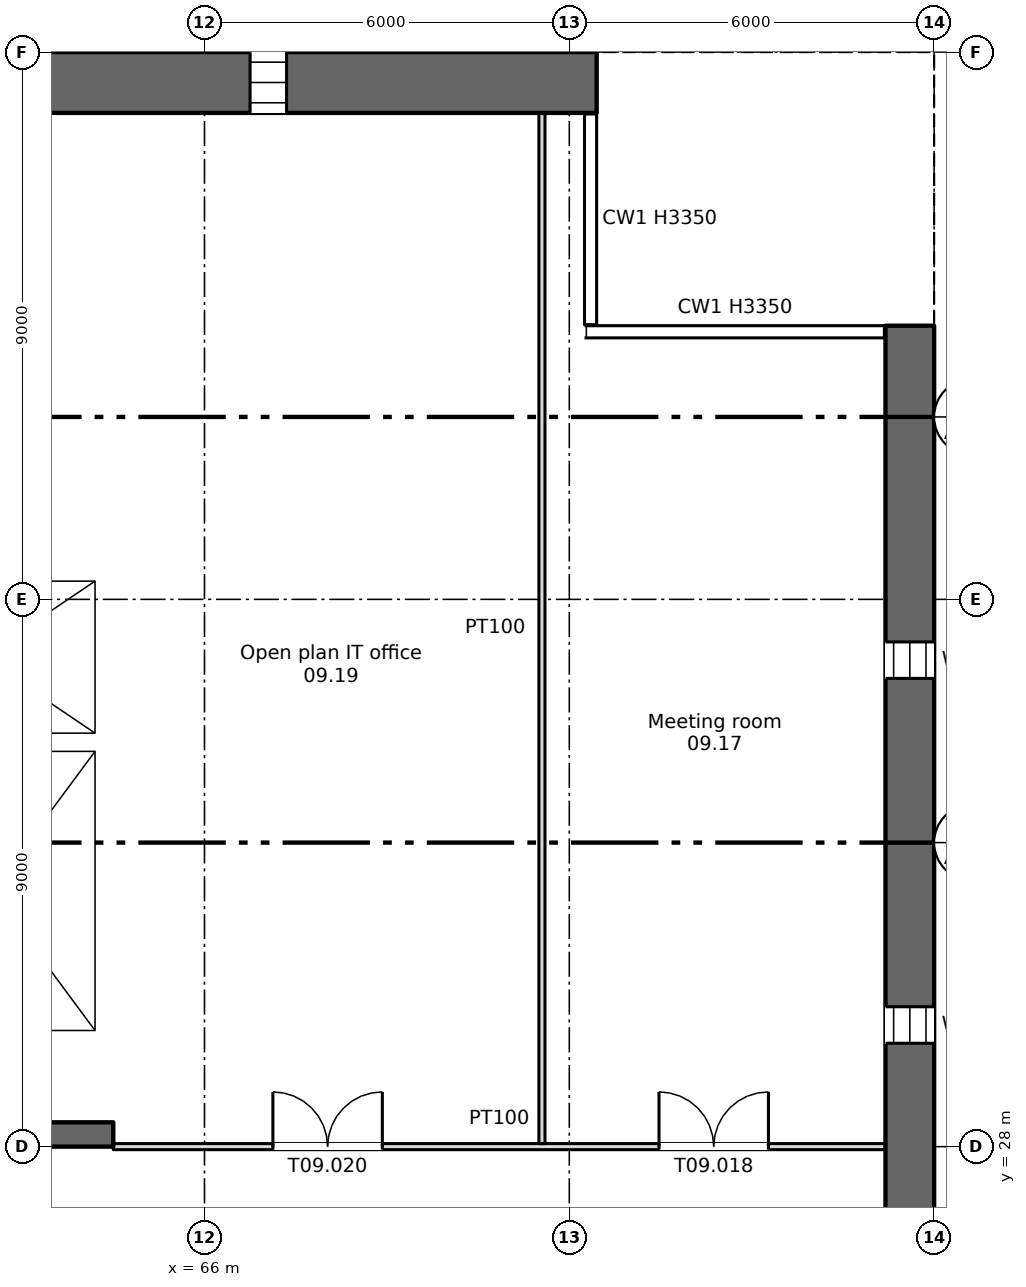
"""IFC4 building model, lengths in metres.
Left out: names, types, materials, properties, quantities, classifications, styles, units other than length and angle.
Written with IfcOpenShell. Run it as: python <this file> out.ifc"""

import sys

from ifc_helpers import new_model, si_unit, direction, frame, frame_2d, origin, place, context, subcontext, project, spatial, rectangle, extrude, element, fill, save


model = new_model("IFC4")
c1 = context("Model", 3, precision=1e-05, world=origin(), true_north=direction((0.0, 1.0)))
c2 = subcontext(c1, "Body", "Model", "MODEL_VIEW")
j1 = project(units=[si_unit("LENGTHUNIT", "METRE"), si_unit("PLANEANGLEUNIT", "RADIAN")], contexts=[c1])
p1 = place(None, origin())
s1 = spatial("IfcSite", under=j1, at=p1, CompositionType="ELEMENT")
p2 = place(p1, origin())
s2 = spatial("IfcBuilding", under=s1, at=p2, CompositionType="ELEMENT")
p3 = place(p2, frame((0.0, 0.0, 41.25)))
s3 = spatial("IfcBuildingStorey", under=s2, at=p3, CompositionType="ELEMENT", Elevation=41.25)
p4 = place(p3, frame((77.6, 4.5, 0.0), z_axis=(0.0, 0.0, 1.0), x_axis=(0.0, 1.0, 0.0)))
e1 = element("IfcWall", 1, at=p4, inside=s3, PredefinedType="SHEAR", context=c2, shape_type="SweptSolid", body=[
    extrude(rectangle(XDim=37.0, YDim=0.8, at=frame_2d((18.5, 0.0))), origin(), (0.0, 0.0, 1.0), 3.35),
])
p5 = place(p4, frame((1.2, 0.0, 0.6)))
e2 = element("IfcOpeningElement", 2, at=p5, cuts=e1, PredefinedType="OPENING", context=c2, shape_type="SweptSolid", body=[
    extrude(rectangle(XDim=0.6, YDim=2.4, at=frame_2d((0.3, 1.2))), frame((0.0, 0.41, 0.0), z_axis=(0.0, -1.0, 0.0), x_axis=(1.0, 0.0, 0.0)), (0.0, 0.0, 1.0), 0.82),
])
p6 = place(p4, frame((7.2, 0.0, 0.6)))
e3 = element("IfcOpeningElement", 3, at=p6, cuts=e1, PredefinedType="OPENING", context=c2, shape_type="SweptSolid", body=[
    extrude(rectangle(XDim=0.6, YDim=2.4, at=frame_2d((0.3, 1.2))), frame((0.0, 0.41, 0.0), z_axis=(0.0, -1.0, 0.0), x_axis=(1.0, 0.0, 0.0)), (0.0, 0.0, 1.0), 0.82),
])
p7 = place(p4, frame((13.2, 0.0, 0.6)))
e4 = element("IfcOpeningElement", 4, at=p7, cuts=e1, PredefinedType="OPENING", context=c2, shape_type="SweptSolid", body=[
    extrude(rectangle(XDim=0.6, YDim=2.4, at=frame_2d((0.3, 1.2))), frame((0.0, 0.41, 0.0), z_axis=(0.0, -1.0, 0.0), x_axis=(1.0, 0.0, 0.0)), (0.0, 0.0, 1.0), 0.82),
])
p8 = place(p4, frame((19.2, 0.0, 0.6)))
e5 = element("IfcOpeningElement", 5, at=p8, cuts=e1, PredefinedType="OPENING", context=c2, shape_type="SweptSolid", body=[
    extrude(rectangle(XDim=0.6, YDim=2.4, at=frame_2d((0.3, 1.2))), frame((0.0, 0.41, 0.0), z_axis=(0.0, -1.0, 0.0), x_axis=(1.0, 0.0, 0.0)), (0.0, 0.0, 1.0), 0.82),
])
p9 = place(p4, frame((25.2, 0.0, 0.6)))
e6 = element("IfcOpeningElement", 6, at=p9, cuts=e1, PredefinedType="OPENING", context=c2, shape_type="SweptSolid", body=[
    extrude(rectangle(XDim=0.6, YDim=2.4, at=frame_2d((0.3, 1.2))), frame((0.0, 0.41, 0.0), z_axis=(0.0, -1.0, 0.0), x_axis=(1.0, 0.0, 0.0)), (0.0, 0.0, 1.0), 0.82),
])
p10 = place(p4, frame((31.2, 0.0, 0.6)))
e7 = element("IfcOpeningElement", 7, at=p10, cuts=e1, PredefinedType="OPENING", context=c2, shape_type="SweptSolid", body=[
    extrude(rectangle(XDim=0.6, YDim=2.4, at=frame_2d((0.3, 1.2))), frame((0.0, 0.41, 0.0), z_axis=(0.0, -1.0, 0.0), x_axis=(1.0, 0.0, 0.0)), (0.0, 0.0, 1.0), 0.82),
])
p11 = place(p3, frame((5.55, 45.5, 0.0), z_axis=(0.0, 0.0, 1.0), x_axis=(1.0, 0.0, 0.0)))
e8 = element("IfcWall", 8, at=p11, inside=s3, PredefinedType="SHEAR", context=c2, shape_type="SweptSolid", body=[
    extrude(rectangle(XDim=66.9, YDim=1.0, at=frame_2d((33.45, 0.0))), origin(), (0.0, 0.0, 1.0), 3.35),
])
p12 = place(p11, frame((1.2, 0.0, 0.6)))
e9 = element("IfcOpeningElement", 9, at=p12, cuts=e8, PredefinedType="OPENING", context=c2, shape_type="SweptSolid", body=[
    extrude(rectangle(XDim=0.6, YDim=2.4, at=frame_2d((0.3, 1.2))), frame((0.0, 0.51, 0.0), z_axis=(0.0, -1.0, 0.0), x_axis=(1.0, 0.0, 0.0)), (0.0, 0.0, 1.0), 1.02),
])
p13 = place(p11, frame((7.2, 0.0, 0.6)))
e10 = element("IfcOpeningElement", 10, at=p13, cuts=e8, PredefinedType="OPENING", context=c2, shape_type="SweptSolid", body=[
    extrude(rectangle(XDim=0.6, YDim=2.4, at=frame_2d((0.3, 1.2))), frame((0.0, 0.51, 0.0), z_axis=(0.0, -1.0, 0.0), x_axis=(1.0, 0.0, 0.0)), (0.0, 0.0, 1.0), 1.02),
])
p14 = place(p11, frame((55.2, 0.0, 0.6)))
e11 = element("IfcOpeningElement", 11, at=p14, cuts=e8, PredefinedType="OPENING", context=c2, shape_type="SweptSolid", body=[
    extrude(rectangle(XDim=0.6, YDim=2.4, at=frame_2d((0.3, 1.2))), frame((0.0, 0.51, 0.0), z_axis=(0.0, -1.0, 0.0), x_axis=(1.0, 0.0, 0.0)), (0.0, 0.0, 1.0), 1.02),
])
p15 = place(p11, frame((61.2, 0.0, 0.6)))
e12 = element("IfcOpeningElement", 12, at=p15, cuts=e8, PredefinedType="OPENING", context=c2, shape_type="SweptSolid", body=[
    extrude(rectangle(XDim=0.6, YDim=2.4, at=frame_2d((0.3, 1.2))), frame((0.0, 0.51, 0.0), z_axis=(0.0, -1.0, 0.0), x_axis=(1.0, 0.0, 0.0)), (0.0, 0.0, 1.0), 1.02),
])
p16 = place(p3, frame((6.7, 28.2, 0.0), z_axis=(0.0, 0.0, 1.0), x_axis=(1.0, 0.0, 0.0)))
e13 = element("IfcWall", 13, at=p16, inside=s3, PredefinedType="SHEAR", context=c2, shape_type="SweptSolid", body=[
    extrude(rectangle(XDim=57.8, YDim=0.4, at=frame_2d((28.9, 0.0))), origin(), (0.0, 0.0, 1.0), 3.35),
])
p17 = place(p16, frame((12.812, 0.0, 0.0)))
e14 = element("IfcOpeningElement", 14, at=p17, cuts=e13, PredefinedType="OPENING", context=c2, shape_type="SweptSolid", body=[
    extrude(rectangle(XDim=0.9, YDim=2.1, at=frame_2d((0.45, 1.05))), frame((0.0, 0.21, 0.0), z_axis=(0.0, -1.0, 0.0), x_axis=(1.0, 0.0, 0.0)), (0.0, 0.0, 1.0), 0.42),
])
p18 = place(p16, frame((15.387, 0.0, 0.0)))
e15 = element("IfcOpeningElement", 15, at=p18, cuts=e13, PredefinedType="OPENING", context=c2, shape_type="SweptSolid", body=[
    extrude(rectangle(XDim=0.9, YDim=2.1, at=frame_2d((0.45, 1.05))), frame((0.0, 0.21, 0.0), z_axis=(0.0, -1.0, 0.0), x_axis=(1.0, 0.0, 0.0)), (0.0, 0.0, 1.0), 0.42),
])
p19 = place(p16, frame((48.312, 0.0, 0.0)))
e16 = element("IfcOpeningElement", 16, at=p19, cuts=e13, PredefinedType="OPENING", context=c2, shape_type="SweptSolid", body=[
    extrude(rectangle(XDim=0.9, YDim=2.1, at=frame_2d((0.45, 1.05))), frame((0.0, 0.21, 0.0), z_axis=(0.0, -1.0, 0.0), x_axis=(1.0, 0.0, 0.0)), (0.0, 0.0, 1.0), 0.42),
])
p20 = place(p16, frame((50.887, 0.0, 0.0)))
e17 = element("IfcOpeningElement", 17, at=p20, cuts=e13, PredefinedType="OPENING", context=c2, shape_type="SweptSolid", body=[
    extrude(rectangle(XDim=0.9, YDim=2.1, at=frame_2d((0.45, 1.05))), frame((0.0, 0.21, 0.0), z_axis=(0.0, -1.0, 0.0), x_axis=(1.0, 0.0, 0.0)), (0.0, 0.0, 1.0), 0.42),
])
p21 = place(p16, frame((0.562, 0.0, 0.0)))
e18 = element("IfcOpeningElement", 18, at=p21, cuts=e13, PredefinedType="OPENING", context=c2, shape_type="SweptSolid", body=[
    extrude(rectangle(XDim=0.9, YDim=2.1, at=frame_2d((0.45, 1.05))), frame((0.0, 0.21, 0.0), z_axis=(0.0, -1.0, 0.0), x_axis=(1.0, 0.0, 0.0)), (0.0, 0.0, 1.0), 0.42),
])
p22 = place(p16, frame((2.137, 0.0, 0.0)))
e19 = element("IfcOpeningElement", 19, at=p22, cuts=e13, PredefinedType="OPENING", context=c2, shape_type="SweptSolid", body=[
    extrude(rectangle(XDim=0.9, YDim=2.1, at=frame_2d((0.45, 1.05))), frame((0.0, 0.21, 0.0), z_axis=(0.0, -1.0, 0.0), x_axis=(1.0, 0.0, 0.0)), (0.0, 0.0, 1.0), 0.42),
])
p23 = place(p16, frame((4.7, 0.0, 0.0)))
e20 = element("IfcOpeningElement", 20, at=p23, cuts=e13, PredefinedType="OPENING", context=c2, shape_type="SweptSolid", body=[
    extrude(rectangle(XDim=1.2, YDim=2.1, at=frame_2d((0.6, 1.05))), frame((0.0, 0.21, 0.0), z_axis=(0.0, -1.0, 0.0), x_axis=(1.0, 0.0, 0.0)), (0.0, 0.0, 1.0), 0.42),
])
p24 = place(p16, frame((31.7, 0.0, 0.0)))
e21 = element("IfcOpeningElement", 21, at=p24, cuts=e13, PredefinedType="OPENING", context=c2, shape_type="SweptSolid", body=[
    extrude(rectangle(XDim=1.2, YDim=2.1, at=frame_2d((0.6, 1.05))), frame((0.0, 0.21, 0.0), z_axis=(0.0, -1.0, 0.0), x_axis=(1.0, 0.0, 0.0)), (0.0, 0.0, 1.0), 0.42),
])
p25 = place(p16, frame((55.2, 0.0, 0.0)))
e22 = element("IfcOpeningElement", 22, at=p25, cuts=e13, PredefinedType="OPENING", context=c2, shape_type="SweptSolid", body=[
    extrude(rectangle(XDim=1.2, YDim=2.1, at=frame_2d((0.6, 1.05))), frame((0.0, 0.21, 0.0), z_axis=(0.0, -1.0, 0.0), x_axis=(1.0, 0.0, 0.0)), (0.0, 0.0, 1.0), 0.42),
])
p26 = place(p16, frame((21.7, 0.0, 0.0)))
e23 = element("IfcOpeningElement", 23, at=p26, cuts=e13, PredefinedType="OPENING", context=c2, shape_type="SweptSolid", body=[
    extrude(rectangle(XDim=1.2, YDim=2.1, at=frame_2d((0.6, 1.05))), frame((0.0, 0.21, 0.0), z_axis=(0.0, -1.0, 0.0), x_axis=(1.0, 0.0, 0.0)), (0.0, 0.0, 1.0), 0.42),
])
p27 = place(p16, frame((41.7, 0.0, 0.0)))
e24 = element("IfcOpeningElement", 24, at=p27, cuts=e13, PredefinedType="OPENING", context=c2, shape_type="SweptSolid", body=[
    extrude(rectangle(XDim=1.2, YDim=2.1, at=frame_2d((0.6, 1.05))), frame((0.0, 0.21, 0.0), z_axis=(0.0, -1.0, 0.0), x_axis=(1.0, 0.0, 0.0)), (0.0, 0.0, 1.0), 0.42),
])
p28 = place(p16, frame((24.85, 0.0, 0.0)))
e25 = element("IfcOpeningElement", 25, at=p28, cuts=e13, PredefinedType="OPENING", context=c2, shape_type="SweptSolid", body=[
    extrude(rectangle(XDim=2.4, YDim=2.1, at=frame_2d((1.2, 1.05))), frame((0.0, 0.21, 0.0), z_axis=(0.0, -1.0, 0.0), x_axis=(1.0, 0.0, 0.0)), (0.0, 0.0, 1.0), 0.42),
])
p29 = place(p16, frame((37.35, 0.0, 0.0)))
e26 = element("IfcOpeningElement", 26, at=p29, cuts=e13, PredefinedType="OPENING", context=c2, shape_type="SweptSolid", body=[
    extrude(rectangle(XDim=2.4, YDim=2.1, at=frame_2d((1.2, 1.05))), frame((0.0, 0.21, 0.0), z_axis=(0.0, -1.0, 0.0), x_axis=(1.0, 0.0, 0.0)), (0.0, 0.0, 1.0), 0.42),
])
p30 = place(p16, frame((7.85, 0.0, 0.0)))
e27 = element("IfcOpeningElement", 27, at=p30, cuts=e13, PredefinedType="OPENING", context=c2, shape_type="SweptSolid", body=[
    extrude(rectangle(XDim=2.4, YDim=2.1, at=frame_2d((1.2, 1.05))), frame((0.0, 0.21, 0.0), z_axis=(0.0, -1.0, 0.0), x_axis=(1.0, 0.0, 0.0)), (0.0, 0.0, 1.0), 0.42),
])
p31 = place(p16, frame((28.85, 0.0, 0.0)))
e28 = element("IfcOpeningElement", 28, at=p31, cuts=e13, PredefinedType="OPENING", context=c2, shape_type="SweptSolid", body=[
    extrude(rectangle(XDim=0.9, YDim=2.1, at=frame_2d((0.45, 1.05))), frame((0.0, 0.21, 0.0), z_axis=(0.0, -1.0, 0.0), x_axis=(1.0, 0.0, 0.0)), (0.0, 0.0, 1.0), 0.42),
])
p32 = place(p16, frame((34.85, 0.0, 0.0)))
e29 = element("IfcOpeningElement", 29, at=p32, cuts=e13, PredefinedType="OPENING", context=c2, shape_type="SweptSolid", body=[
    extrude(rectangle(XDim=0.9, YDim=2.1, at=frame_2d((0.45, 1.05))), frame((0.0, 0.21, 0.0), z_axis=(0.0, -1.0, 0.0), x_axis=(1.0, 0.0, 0.0)), (0.0, 0.0, 1.0), 0.42),
])
p33 = place(p3, frame((64.35, 34.8, 0.0), z_axis=(0.0, 0.0, 1.0), x_axis=(0.0, 1.0, 0.0)))
e30 = element("IfcWall", 30, at=p33, inside=s3, PredefinedType="SHEAR", context=c2, shape_type="SweptSolid", body=[
    extrude(rectangle(XDim=10.2, YDim=0.3, at=frame_2d((5.1, 0.0))), origin(), (0.0, 0.0, 1.0), 3.35),
])
p34 = place(p3, frame((64.35, 28.4, 0.0), z_axis=(0.0, 0.0, 1.0), x_axis=(0.0, 1.0, 0.0)))
e31 = element("IfcWall", 31, at=p34, inside=s3, PredefinedType="SHEAR", context=c2, shape_type="SweptSolid", body=[
    extrude(rectangle(XDim=6.1, YDim=0.3, at=frame_2d((3.05, 0.0))), origin(), (0.0, 0.0, 1.0), 3.35),
])
p35 = place(p3, frame((60.5, 34.65, 0.0), z_axis=(0.0, 0.0, 1.0), x_axis=(1.0, 0.0, 0.0)))
e32 = element("IfcWall", 32, at=p35, inside=s3, PredefinedType="SHEAR", context=c2, shape_type="SweptSolid", body=[
    extrude(rectangle(XDim=4.0, YDim=0.3, at=frame_2d((2.0, 0.0))), origin(), (0.0, 0.0, 1.0), 3.35),
])
p36 = place(p3, frame((60.5, 37.45, 0.0), z_axis=(0.0, 0.0, 1.0), x_axis=(1.0, 0.0, 0.0)))
e33 = element("IfcWall", 33, at=p36, inside=s3, PredefinedType="SHEAR", context=c2, shape_type="SweptSolid", body=[
    extrude(rectangle(XDim=3.7, YDim=0.3, at=frame_2d((1.85, 0.0))), origin(), (0.0, 0.0, 1.0), 3.35),
])
p37 = place(p36, frame((1.3, 0.0, 0.0)))
e34 = element("IfcOpeningElement", 34, at=p37, cuts=e33, PredefinedType="OPENING", context=c2, shape_type="SweptSolid", body=[
    extrude(rectangle(XDim=1.1, YDim=2.1, at=frame_2d((0.55, 1.05))), frame((0.0, 0.16, 0.0), z_axis=(0.0, -1.0, 0.0), x_axis=(1.0, 0.0, 0.0)), (0.0, 0.0, 1.0), 0.32),
])
p38 = place(p3, frame((64.5, 28.0, 0.0), z_axis=(0.0, 0.0, 1.0), x_axis=(1.0, 0.0, 0.0)))
e35 = element("IfcWall", 35, at=p38, inside=s3, PredefinedType="PARTITIONING", context=c2, shape_type="SweptSolid", body=[
    extrude(rectangle(XDim=12.7, YDim=0.1, at=frame_2d((6.35, 0.0))), origin(), (0.0, 0.0, 1.0), 3.35),
])
p39 = place(p38, frame((8.975, 0.0, 0.0)))
e36 = element("IfcOpeningElement", 36, at=p39, cuts=e35, PredefinedType="OPENING", context=c2, shape_type="SweptSolid", body=[
    extrude(rectangle(XDim=1.8, YDim=2.1, at=frame_2d((0.9, 1.05))), frame((0.0, 0.06, 0.0), z_axis=(0.0, -1.0, 0.0), x_axis=(1.0, 0.0, 0.0)), (0.0, 0.0, 1.0), 0.12),
])
p40 = place(p38, frame((2.625, 0.0, 0.0)))
e37 = element("IfcOpeningElement", 37, at=p40, cuts=e35, PredefinedType="OPENING", context=c2, shape_type="SweptSolid", body=[
    extrude(rectangle(XDim=1.8, YDim=2.1, at=frame_2d((0.9, 1.05))), frame((0.0, 0.06, 0.0), z_axis=(0.0, -1.0, 0.0), x_axis=(1.0, 0.0, 0.0)), (0.0, 0.0, 1.0), 0.12),
])
p41 = place(p3, frame((71.55, 28.05, 0.0), z_axis=(0.0, 0.0, 1.0), x_axis=(0.0, 1.0, 0.0)))
e38 = element("IfcWall", 38, at=p41, inside=s3, PredefinedType="PARTITIONING", context=c2, shape_type="SweptSolid", body=[
    extrude(rectangle(XDim=16.95, YDim=0.1, at=frame_2d((8.475, 0.0))), origin(), (0.0, 0.0, 1.0), 3.35),
])
p42 = place(p15, origin())
e39 = element("IfcWindow", 39, at=p42, inside=s3, PartitioningType="SINGLE_PANEL", PredefinedType="WINDOW", context=c2, shape_type="SweptSolid", body=[
    extrude(rectangle(XDim=0.6, YDim=2.4, at=frame_2d((0.3, 1.2))), frame((0.0, 0.03, 0.0), z_axis=(0.0, -1.0, 0.0), x_axis=(1.0, 0.0, 0.0)), (0.0, 0.0, 1.0), 0.06),
])
fill(e12, e39)
p43 = place(p9, origin())
e40 = element("IfcWindow", 40, at=p43, inside=s3, PartitioningType="SINGLE_PANEL", PredefinedType="WINDOW", context=c2, shape_type="SweptSolid", body=[
    extrude(rectangle(XDim=0.6, YDim=2.4, at=frame_2d((0.3, 1.2))), frame((0.0, 0.03, 0.0), z_axis=(0.0, -1.0, 0.0), x_axis=(1.0, 0.0, 0.0)), (0.0, 0.0, 1.0), 0.06),
])
fill(e6, e40)
p44 = place(p10, origin())
e41 = element("IfcWindow", 41, at=p44, inside=s3, PartitioningType="SINGLE_PANEL", PredefinedType="WINDOW", context=c2, shape_type="SweptSolid", body=[
    extrude(rectangle(XDim=0.6, YDim=2.4, at=frame_2d((0.3, 1.2))), frame((0.0, 0.03, 0.0), z_axis=(0.0, -1.0, 0.0), x_axis=(1.0, 0.0, 0.0)), (0.0, 0.0, 1.0), 0.06),
])
fill(e7, e41)
p45 = place(p39, origin())
e42 = element("IfcDoor", 42, at=p45, inside=s3, OperationType="DOUBLE_DOOR_SINGLE_SWING", PredefinedType="DOOR", context=c2, shape_type="SweptSolid", body=[
    extrude(rectangle(XDim=1.8, YDim=2.1, at=frame_2d((0.9, 1.05))), frame((0.0, 0.025, 0.0), z_axis=(0.0, -1.0, 0.0), x_axis=(1.0, 0.0, 0.0)), (0.0, 0.0, 1.0), 0.05),
])
fill(e36, e42)
p46 = place(p40, origin())
e43 = element("IfcDoor", 43, at=p46, inside=s3, OperationType="DOUBLE_DOOR_SINGLE_SWING", PredefinedType="DOOR", context=c2, shape_type="SweptSolid", body=[
    extrude(rectangle(XDim=1.8, YDim=2.1, at=frame_2d((0.9, 1.05))), frame((0.0, 0.025, 0.0), z_axis=(0.0, -1.0, 0.0), x_axis=(1.0, 0.0, 0.0)), (0.0, 0.0, 1.0), 0.05),
])
fill(e37, e43)
save(model, sys.argv[1])
